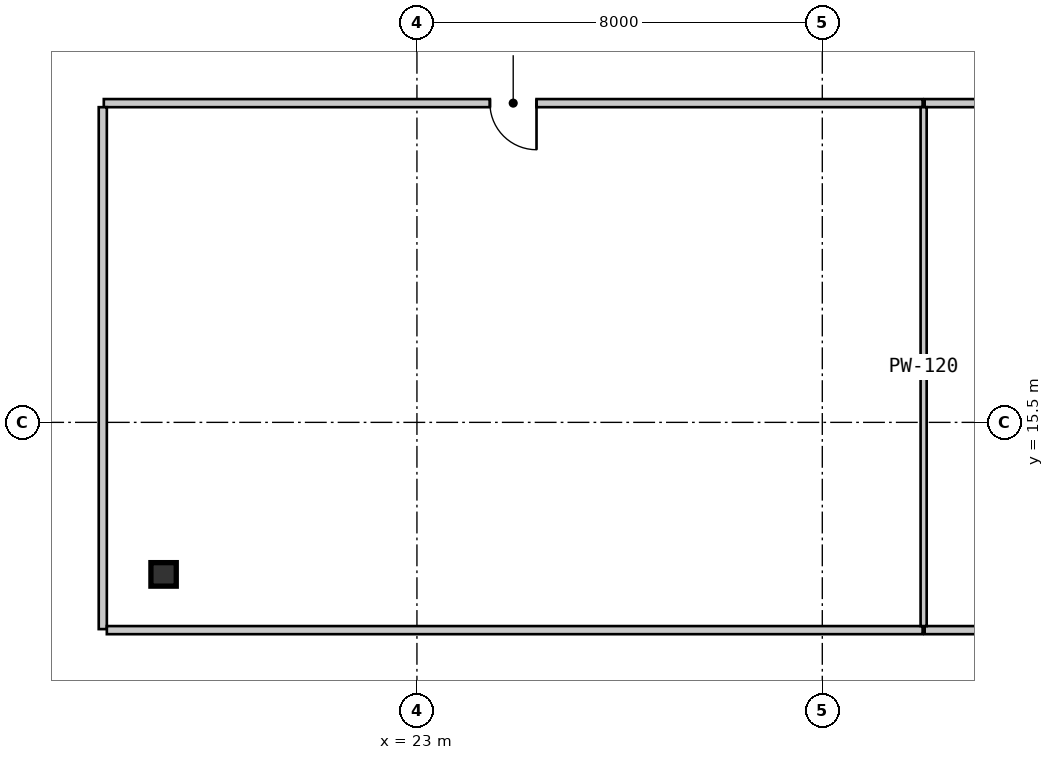
"""IFC4 building model, lengths in metres.
Left out: names, types, materials, properties, quantities, classifications, styles, units other than length and angle.
Written with IfcOpenShell. Run it as: python <this file> out.ifc"""

import sys

from ifc_helpers import new_model, si_unit, direction, frame, frame_2d, origin, origin_2d, place, context, subcontext, project, spatial, rectangle, i_section, extrude, source, transform, mapped, element, fill, save


model = new_model("IFC4")
c1 = context("Model", 3, precision=1e-05, world=origin(), true_north=direction((0.0, 1.0)))
c2 = subcontext(c1, "Body", "Model", "MODEL_VIEW")
j1 = project(units=[si_unit("LENGTHUNIT", "METRE"), si_unit("PLANEANGLEUNIT", "RADIAN")], contexts=[c1])
p1 = place(None, origin())
s1 = spatial("IfcSite", under=j1, at=p1, CompositionType="ELEMENT")
p2 = place(p1, origin())
s2 = spatial("IfcBuilding", under=s1, at=p2, CompositionType="ELEMENT")
p3 = place(p2, frame((0.0, 0.0, 80.85)))
s3 = spatial("IfcBuildingStorey", under=s2, at=p3, CompositionType="ELEMENT", Elevation=80.85)
m1 = source(origin(), c2, "Body", "SweptSolid", [
    extrude(i_section(OverallWidth=0.5, OverallDepth=0.464, WebThickness=0.022, FlangeThickness=0.034, at=origin_2d()), origin(), (0.0, 0.0, 1.0), 3.15),
])
p4 = place(p3, frame((18.0, 12.5, 0.0), z_axis=(0.0, 0.0, 1.0), x_axis=(1.0, 0.0, 0.0)))
e1 = element("IfcColumn", 1, at=p4, inside=s3, PredefinedType="COLUMN", context=c2, shape_type="MappedRepresentation", body=[
    mapped(m1, transform((0.0, 0.0, 0.0), scale=1.0)),
])
m2 = source(origin(), c2, "Body", "SweptSolid", [
    extrude(rectangle(XDim=16.159, YDim=0.16, at=frame_2d((8.08, 0.0))), origin(), (0.0, 0.0, 1.0), 2.93),
])
p5 = place(p3, frame((32.98, 21.8, 0.0), z_axis=(0.0, 0.0, 1.0), x_axis=(-1.0, 0.0, 0.0)))
e2 = element("IfcWall", 2, at=p5, inside=s3, PredefinedType="PARTITIONING", context=c2, shape_type="MappedRepresentation", body=[
    mapped(m2, transform((0.0, 0.0, 0.0), scale=1.0)),
])
m3 = source(origin(), c2, "Body", "SweptSolid", [
    extrude(rectangle(XDim=0.92, YDim=2.1, at=frame_2d((0.46, 1.05))), frame((0.0, 0.09, 0.0), z_axis=(0.0, -1.0, 0.0), x_axis=(1.0, 0.0, 0.0)), (0.0, 0.0, 1.0), 0.18),
])
p6 = place(p5, frame((7.62, 0.0, 0.0)))
e3 = element("IfcOpeningElement", 3, at=p6, cuts=e2, PredefinedType="OPENING", context=c2, shape_type="MappedRepresentation", body=[
    mapped(m3, transform((0.0, 0.0, 0.0), scale=1.0)),
])
m4 = source(origin(), c2, "Body", "SweptSolid", [
    extrude(rectangle(XDim=10.3, YDim=0.16, at=frame_2d((5.15, 0.0))), origin(), (0.0, 0.0, 1.0), 2.93),
])
p7 = place(p3, frame((16.8, 21.72, 0.0), z_axis=(0.0, 0.0, 1.0), x_axis=(0.0, -1.0, 0.0)))
e4 = element("IfcWall", 4, at=p7, inside=s3, PredefinedType="PARTITIONING", context=c2, shape_type="MappedRepresentation", body=[
    mapped(m4, transform((0.0, 0.0, 0.0), scale=1.0)),
])
m5 = source(origin(), c2, "Body", "SweptSolid", [
    extrude(rectangle(XDim=9.959, YDim=0.16, at=frame_2d((4.98, 0.0))), origin(), (0.0, 0.0, 1.0), 2.93),
])
p8 = place(p3, frame((42.98, 21.8, 0.0), z_axis=(0.0, 0.0, 1.0), x_axis=(-1.0, 0.0, 0.0)))
e5 = element("IfcWall", 5, at=p8, inside=s3, PredefinedType="PARTITIONING", context=c2, shape_type="MappedRepresentation", body=[
    mapped(m5, transform((0.0, 0.0, 0.0), scale=1.0)),
])
m6 = source(origin(), c2, "Body", "SweptSolid", [
    extrude(rectangle(XDim=1.05, YDim=2.1, at=frame_2d((0.525, 1.05))), frame((0.0, 0.09, 0.0), z_axis=(0.0, -1.0, 0.0), x_axis=(1.0, 0.0, 0.0)), (0.0, 0.0, 1.0), 0.18),
])
p9 = place(p8, frame((4.455, 0.0, 0.0)))
e6 = element("IfcOpeningElement", 6, at=p9, cuts=e5, PredefinedType="OPENING", context=c2, shape_type="MappedRepresentation", body=[
    mapped(m6, transform((0.0, 0.0, 0.0), scale=1.0)),
])
m7 = source(origin(), c2, "Body", "SweptSolid", [
    extrude(rectangle(XDim=16.1, YDim=0.16, at=frame_2d((8.05, 0.0))), origin(), (0.0, 0.0, 1.0), 2.93),
])
p10 = place(p3, frame((16.88, 11.4, 0.0), z_axis=(0.0, 0.0, 1.0), x_axis=(1.0, 0.0, 0.0)))
e7 = element("IfcWall", 7, at=p10, inside=s3, PredefinedType="PARTITIONING", context=c2, shape_type="MappedRepresentation", body=[
    mapped(m7, transform((0.0, 0.0, 0.0), scale=1.0)),
])
p11 = place(p3, frame((33.02, 11.4, 0.0), z_axis=(0.0, 0.0, 1.0), x_axis=(1.0, 0.0, 0.0)))
e8 = element("IfcWall", 8, at=p11, inside=s3, PredefinedType="PARTITIONING", context=c2, shape_type="MappedRepresentation", body=[
    mapped(m5, transform((0.0, 0.0, 0.0), scale=1.0)),
])
m8 = source(origin(), c2, "Body", "SweptSolid", [
    extrude(rectangle(XDim=10.24, YDim=0.12, at=frame_2d((5.12, 0.0))), origin(), (0.0, 0.0, 1.0), 2.93),
])
p12 = place(p3, frame((33.0, 21.72, 0.0), z_axis=(0.0, 0.0, 1.0), x_axis=(0.0, -1.0, 0.0)))
e9 = element("IfcWall", 9, at=p12, inside=s3, PredefinedType="PARTITIONING", context=c2, shape_type="MappedRepresentation", body=[
    mapped(m8, transform((0.0, 0.0, 0.0), scale=1.0)),
])
m9 = source(origin(), c2, "Body", "SweptSolid", [
    extrude(rectangle(XDim=0.92, YDim=2.1, at=frame_2d((0.46, 1.05))), frame((0.0, 0.025, 0.0), z_axis=(0.0, -1.0, 0.0), x_axis=(1.0, 0.0, 0.0)), (0.0, 0.0, 1.0), 0.05),
])
p13 = place(p6, origin())
e10 = element("IfcDoor", 10, at=p13, inside=s3, OperationType="SINGLE_SWING_LEFT", PredefinedType="DOOR", context=c2, shape_type="MappedRepresentation", body=[
    mapped(m9, transform((0.0, 0.0, 0.0), scale=1.0)),
])
fill(e3, e10)
save(model, sys.argv[1])
